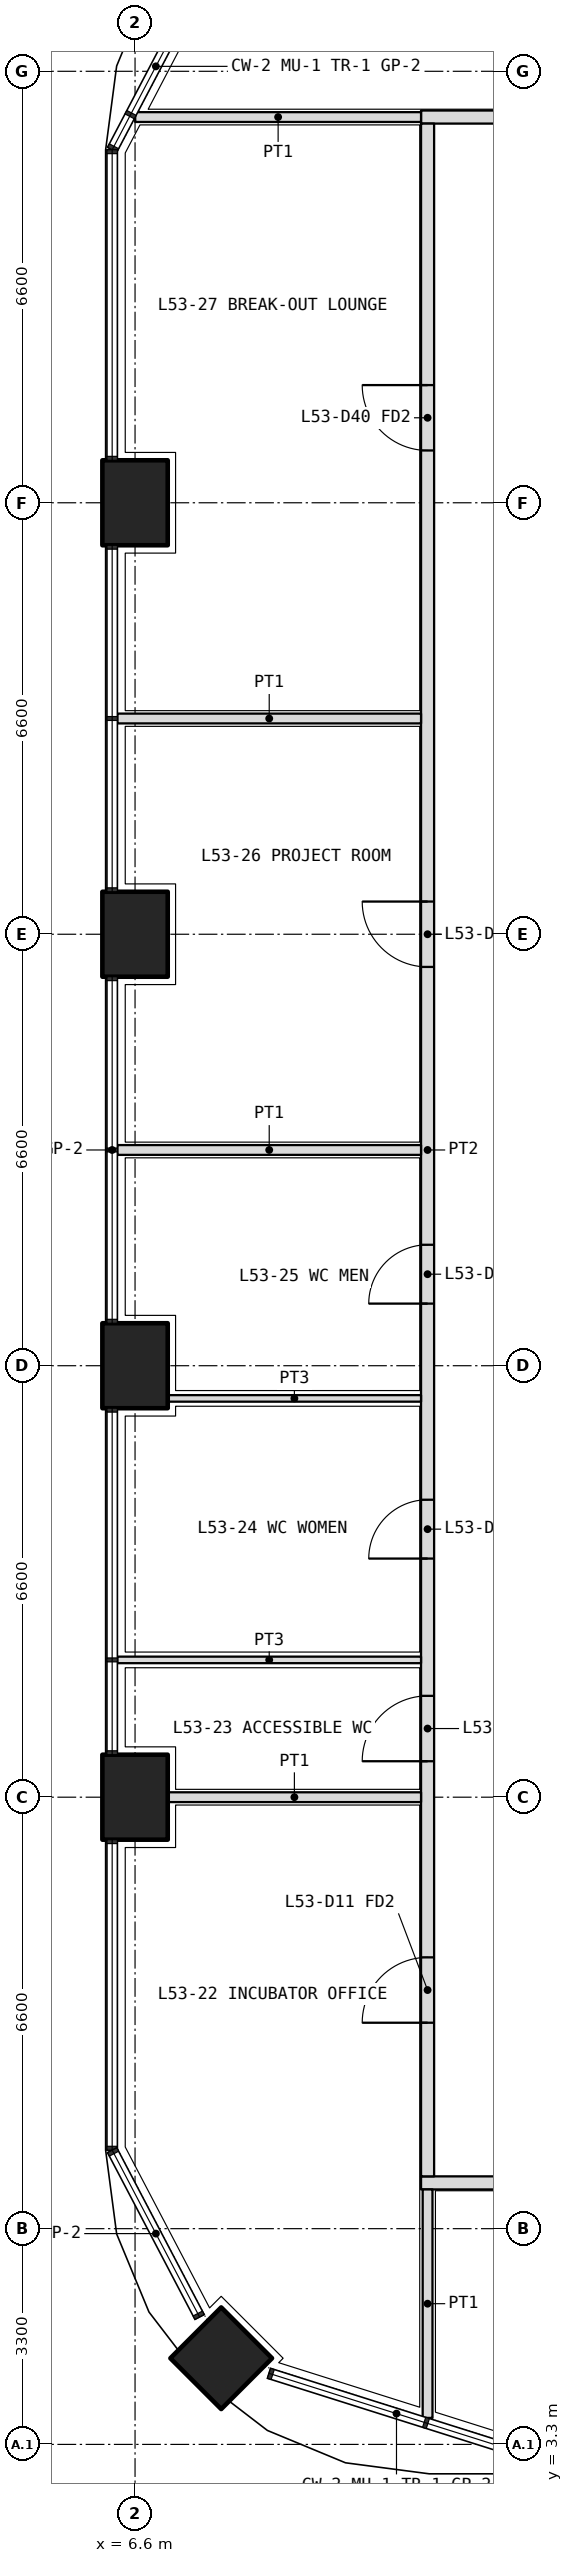
"""IFC4 building model, lengths in metres.
Left out: names, types, materials, properties, quantities, classifications, styles, units other than length and angle.
Written with IfcOpenShell. Run it as: python <this file> out.ifc"""

import sys

from ifc_helpers import new_model, si_unit, direction, frame, frame_2d, origin, origin_2d, place, context, subcontext, project, spatial, rectangle, extrude, element, fill, save


model = new_model("IFC4")
c1 = context("Model", 3, precision=1e-05, world=origin(), true_north=direction((0.0, 1.0)))
c2 = subcontext(c1, "Body", "Model", "MODEL_VIEW")
j1 = project(units=[si_unit("LENGTHUNIT", "METRE"), si_unit("PLANEANGLEUNIT", "RADIAN")], contexts=[c1])
p1 = place(None, origin())
s1 = spatial("IfcSite", under=j1, at=p1, CompositionType="ELEMENT")
p2 = place(p1, origin())
s2 = spatial("IfcBuilding", under=s1, at=p2, CompositionType="ELEMENT")
p3 = place(p2, frame((0.0, 0.0, 233.4)))
s3 = spatial("IfcBuildingStorey", under=s2, at=p3, CompositionType="ELEMENT", Elevation=233.4)
p4 = place(p3, frame((7.918, 4.618, 0.0), z_axis=(0.0, 0.0, 1.0), x_axis=(0.707106781187, 0.707106781187, 0.0)))
e1 = element("IfcColumn", 1, at=p4, inside=s3, PredefinedType="COLUMN", context=c2, shape_type="SweptSolid", body=[
    extrude(rectangle(XDim=1.1, YDim=1.1, at=origin_2d()), origin(), (0.0, 0.0, 1.0), 4.2),
])
for number, where, z_axis, x_axis in (
    (2, (6.6, 13.2, 0.0), (0.0, 0.0, 1.0), (0.0, 1.0, 0.0)),
    (3, (6.6, 19.8, 0.0), (0.0, 0.0, 1.0), (0.0, 1.0, 0.0)),
    (4, (6.6, 26.4, 0.0), (0.0, 0.0, 1.0), (0.0, 1.0, 0.0)),
    (5, (6.6, 33.0, 0.0), (0.0, 0.0, 1.0), (0.0, 1.0, 0.0)),
):
    element("IfcColumn", number, at=place(p3, frame(where, z_axis=z_axis, x_axis=x_axis)), inside=s3, PredefinedType="COLUMN", context=c2, shape_type="SweptSolid", body=[
        extrude(rectangle(XDim=1.3, YDim=1.0, at=origin_2d()), origin(), (0.0, 0.0, 1.0), 4.2),
    ])
p5 = place(p3, frame((10.975, 7.3, 0.0), z_axis=(0.0, 0.0, 1.0), x_axis=(1.0, 0.0, 0.0)))
e6 = element("IfcWall", 6, at=p5, inside=s3, PredefinedType="PARTITIONING", context=c2, shape_type="SweptSolid", body=[
    extrude(rectangle(XDim=30.85, YDim=0.2, at=frame_2d((15.425, 0.0))), origin(), (0.0, 0.0, 1.0), 3.0),
])
p6 = place(p5, frame((2.312, 0.0, 0.0)))
e7 = element("IfcOpeningElement", 7, at=p6, cuts=e6, PredefinedType="OPENING", context=c2, shape_type="SweptSolid", body=[
    extrude(rectangle(XDim=1.0, YDim=2.1, at=frame_2d((0.5, 1.05))), frame((0.0, 0.11, 0.0), z_axis=(0.0, -1.0, 0.0), x_axis=(1.0, 0.0, 0.0)), (0.0, 0.0, 1.0), 0.22),
])
p7 = place(p5, frame((13.275, 0.0, 0.0)))
e8 = element("IfcOpeningElement", 8, at=p7, cuts=e6, PredefinedType="OPENING", context=c2, shape_type="SweptSolid", body=[
    extrude(rectangle(XDim=1.0, YDim=2.1, at=frame_2d((0.5, 1.05))), frame((0.0, 0.11, 0.0), z_axis=(0.0, -1.0, 0.0), x_axis=(1.0, 0.0, 0.0)), (0.0, 0.0, 1.0), 0.22),
])
p8 = place(p5, frame((23.625, 0.0, 0.0)))
e9 = element("IfcOpeningElement", 9, at=p8, cuts=e6, PredefinedType="OPENING", context=c2, shape_type="SweptSolid", body=[
    extrude(rectangle(XDim=1.0, YDim=2.1, at=frame_2d((0.5, 1.05))), frame((0.0, 0.11, 0.0), z_axis=(0.0, -1.0, 0.0), x_axis=(1.0, 0.0, 0.0)), (0.0, 0.0, 1.0), 0.22),
])
p9 = place(p5, frame((26.925, 0.0, 0.0)))
e10 = element("IfcOpeningElement", 10, at=p9, cuts=e6, PredefinedType="OPENING", context=c2, shape_type="SweptSolid", body=[
    extrude(rectangle(XDim=1.0, YDim=2.1, at=frame_2d((0.5, 1.05))), frame((0.0, 0.11, 0.0), z_axis=(0.0, -1.0, 0.0), x_axis=(1.0, 0.0, 0.0)), (0.0, 0.0, 1.0), 0.22),
])
p10 = place(p5, frame((29.188, 0.0, 0.0)))
e11 = element("IfcOpeningElement", 11, at=p10, cuts=e6, PredefinedType="OPENING", context=c2, shape_type="SweptSolid", body=[
    extrude(rectangle(XDim=1.0, YDim=2.1, at=frame_2d((0.5, 1.05))), frame((0.0, 0.11, 0.0), z_axis=(0.0, -1.0, 0.0), x_axis=(1.0, 0.0, 0.0)), (0.0, 0.0, 1.0), 0.22),
])
p11 = place(p3, frame((10.975, 38.9, 0.0), z_axis=(0.0, 0.0, 1.0), x_axis=(1.0, 0.0, 0.0)))
e12 = element("IfcWall", 12, at=p11, inside=s3, PredefinedType="PARTITIONING", context=c2, shape_type="SweptSolid", body=[
    extrude(rectangle(XDim=8.825, YDim=0.2, at=frame_2d((4.413, 0.0))), origin(), (0.0, 0.0, 1.0), 3.0),
])
p12 = place(p11, frame((3.962, 0.0, 0.0)))
e13 = element("IfcOpeningElement", 13, at=p12, cuts=e12, PredefinedType="OPENING", context=c2, shape_type="SweptSolid", body=[
    extrude(rectangle(XDim=1.0, YDim=2.1, at=frame_2d((0.5, 1.05))), frame((0.0, 0.11, 0.0), z_axis=(0.0, -1.0, 0.0), x_axis=(1.0, 0.0, 0.0)), (0.0, 0.0, 1.0), 0.22),
])
p13 = place(p3, frame((11.075, 7.4, 0.0), z_axis=(0.0, 0.0, 1.0), x_axis=(0.0, 1.0, 0.0)))
e14 = element("IfcWall", 14, at=p13, inside=s3, PredefinedType="PARTITIONING", context=c2, shape_type="SweptSolid", body=[
    extrude(rectangle(XDim=31.4, YDim=0.2, at=frame_2d((15.7, 0.0))), origin(), (0.0, 0.0, 1.0), 3.0),
])
p14 = place(p13, frame((2.35, 0.0, 0.0)))
e15 = element("IfcOpeningElement", 15, at=p14, cuts=e14, PredefinedType="OPENING", context=c2, shape_type="SweptSolid", body=[
    extrude(rectangle(XDim=1.0, YDim=2.1, at=frame_2d((0.5, 1.05))), frame((0.0, 0.11, 0.0), z_axis=(0.0, -1.0, 0.0), x_axis=(1.0, 0.0, 0.0)), (0.0, 0.0, 1.0), 0.22),
])
p15 = place(p13, frame((6.35, 0.0, 0.0)))
e16 = element("IfcOpeningElement", 16, at=p15, cuts=e14, PredefinedType="OPENING", context=c2, shape_type="SweptSolid", body=[
    extrude(rectangle(XDim=1.0, YDim=2.1, at=frame_2d((0.5, 1.05))), frame((0.0, 0.11, 0.0), z_axis=(0.0, -1.0, 0.0), x_axis=(1.0, 0.0, 0.0)), (0.0, 0.0, 1.0), 0.22),
])
p16 = place(p13, frame((9.45, 0.0, 0.0)))
e17 = element("IfcOpeningElement", 17, at=p16, cuts=e14, PredefinedType="OPENING", context=c2, shape_type="SweptSolid", body=[
    extrude(rectangle(XDim=0.9, YDim=2.1, at=frame_2d((0.45, 1.05))), frame((0.0, 0.11, 0.0), z_axis=(0.0, -1.0, 0.0), x_axis=(1.0, 0.0, 0.0)), (0.0, 0.0, 1.0), 0.22),
])
p17 = place(p13, frame((13.35, 0.0, 0.0)))
e18 = element("IfcOpeningElement", 18, at=p17, cuts=e14, PredefinedType="OPENING", context=c2, shape_type="SweptSolid", body=[
    extrude(rectangle(XDim=0.9, YDim=2.1, at=frame_2d((0.45, 1.05))), frame((0.0, 0.11, 0.0), z_axis=(0.0, -1.0, 0.0), x_axis=(1.0, 0.0, 0.0)), (0.0, 0.0, 1.0), 0.22),
])
p18 = place(p13, frame((18.5, 0.0, 0.0)))
e19 = element("IfcOpeningElement", 19, at=p18, cuts=e14, PredefinedType="OPENING", context=c2, shape_type="SweptSolid", body=[
    extrude(rectangle(XDim=1.0, YDim=2.1, at=frame_2d((0.5, 1.05))), frame((0.0, 0.11, 0.0), z_axis=(0.0, -1.0, 0.0), x_axis=(1.0, 0.0, 0.0)), (0.0, 0.0, 1.0), 0.22),
])
p19 = place(p13, frame((26.4, 0.0, 0.0)))
e20 = element("IfcOpeningElement", 20, at=p19, cuts=e14, PredefinedType="OPENING", context=c2, shape_type="SweptSolid", body=[
    extrude(rectangle(XDim=1.0, YDim=2.1, at=frame_2d((0.5, 1.05))), frame((0.0, 0.11, 0.0), z_axis=(0.0, -1.0, 0.0), x_axis=(1.0, 0.0, 0.0)), (0.0, 0.0, 1.0), 0.22),
])
p20 = place(p3, frame((11.075, 3.705, 0.0), z_axis=(0.0, 0.0, 1.0), x_axis=(0.0, 1.0, 0.0)))
e21 = element("IfcWall", 21, at=p20, inside=s3, PredefinedType="PARTITIONING", context=c2, shape_type="SweptSolid", body=[
    extrude(rectangle(XDim=3.495, YDim=0.15, at=frame_2d((1.748, 0.0))), origin(), (0.0, 0.0, 1.0), 2.7),
])
p21 = place(p3, frame((6.603, 38.9, 0.0), z_axis=(0.0, 0.0, 1.0), x_axis=(1.0, 0.0, 0.0)))
e22 = element("IfcWall", 22, at=p21, inside=s3, PredefinedType="PARTITIONING", context=c2, shape_type="SweptSolid", body=[
    extrude(rectangle(XDim=4.373, YDim=0.15, at=frame_2d((2.186, 0.0))), origin(), (0.0, 0.0, 1.0), 2.7),
])
p22 = place(p3, frame((6.33, 15.3, 0.0), z_axis=(0.0, 0.0, 1.0), x_axis=(1.0, 0.0, 0.0)))
e23 = element("IfcWall", 23, at=p22, inside=s3, PredefinedType="PARTITIONING", context=c2, shape_type="SweptSolid", body=[
    extrude(rectangle(XDim=4.645, YDim=0.1, at=frame_2d((2.323, 0.0))), origin(), (0.0, 0.0, 1.0), 2.7),
])
p23 = place(p3, frame((7.1, 19.3, 0.0), z_axis=(0.0, 0.0, 1.0), x_axis=(1.0, 0.0, 0.0)))
e24 = element("IfcWall", 24, at=p23, inside=s3, PredefinedType="PARTITIONING", context=c2, shape_type="SweptSolid", body=[
    extrude(rectangle(XDim=3.875, YDim=0.1, at=frame_2d((1.938, 0.0))), origin(), (0.0, 0.0, 1.0), 3.0),
])
p24 = place(p3, frame((6.33, 23.1, 0.0), z_axis=(0.0, 0.0, 1.0), x_axis=(1.0, 0.0, 0.0)))
e25 = element("IfcWall", 25, at=p24, inside=s3, PredefinedType="PARTITIONING", context=c2, shape_type="SweptSolid", body=[
    extrude(rectangle(XDim=4.645, YDim=0.15, at=frame_2d((2.323, 0.0))), origin(), (0.0, 0.0, 1.0), 2.7),
])
p25 = place(p3, frame((7.1, 13.2, 0.0), z_axis=(0.0, 0.0, 1.0), x_axis=(1.0, 0.0, 0.0)))
e26 = element("IfcWall", 26, at=p25, inside=s3, PredefinedType="PARTITIONING", context=c2, shape_type="SweptSolid", body=[
    extrude(rectangle(XDim=3.875, YDim=0.15, at=frame_2d((1.938, 0.0))), origin(), (0.0, 0.0, 1.0), 3.0),
])
p26 = place(p3, frame((6.33, 29.7, 0.0), z_axis=(0.0, 0.0, 1.0), x_axis=(1.0, 0.0, 0.0)))
e27 = element("IfcWall", 27, at=p26, inside=s3, PredefinedType="PARTITIONING", context=c2, shape_type="SweptSolid", body=[
    extrude(rectangle(XDim=4.645, YDim=0.15, at=frame_2d((2.323, 0.0))), origin(), (0.0, 0.0, 1.0), 2.7),
])
p27 = place(p14, origin())
e28 = element("IfcDoor", 28, at=p27, inside=s3, OperationType="SINGLE_SWING_LEFT", PredefinedType="DOOR", context=c2, shape_type="SweptSolid", body=[
    extrude(rectangle(XDim=1.0, YDim=2.1, at=frame_2d((0.5, 1.05))), frame((0.0, 0.025, 0.0), z_axis=(0.0, -1.0, 0.0), x_axis=(1.0, 0.0, 0.0)), (0.0, 0.0, 1.0), 0.05),
])
fill(e15, e28)
p28 = place(p15, origin())
e29 = element("IfcDoor", 29, at=p28, inside=s3, OperationType="SINGLE_SWING_LEFT", PredefinedType="DOOR", context=c2, shape_type="SweptSolid", body=[
    extrude(rectangle(XDim=1.0, YDim=2.1, at=frame_2d((0.5, 1.05))), frame((0.0, 0.025, 0.0), z_axis=(0.0, -1.0, 0.0), x_axis=(1.0, 0.0, 0.0)), (0.0, 0.0, 1.0), 0.05),
])
fill(e16, e29)
p29 = place(p16, origin())
e30 = element("IfcDoor", 30, at=p29, inside=s3, OperationType="SINGLE_SWING_LEFT", PredefinedType="DOOR", context=c2, shape_type="SweptSolid", body=[
    extrude(rectangle(XDim=0.9, YDim=2.1, at=frame_2d((0.45, 1.05))), frame((0.0, 0.025, 0.0), z_axis=(0.0, -1.0, 0.0), x_axis=(1.0, 0.0, 0.0)), (0.0, 0.0, 1.0), 0.05),
])
fill(e17, e30)
p30 = place(p17, origin())
e31 = element("IfcDoor", 31, at=p30, inside=s3, OperationType="SINGLE_SWING_LEFT", PredefinedType="DOOR", context=c2, shape_type="SweptSolid", body=[
    extrude(rectangle(XDim=0.9, YDim=2.1, at=frame_2d((0.45, 1.05))), frame((0.0, 0.025, 0.0), z_axis=(0.0, -1.0, 0.0), x_axis=(1.0, 0.0, 0.0)), (0.0, 0.0, 1.0), 0.05),
])
fill(e18, e31)
p31 = place(p18, origin())
e32 = element("IfcDoor", 32, at=p31, inside=s3, OperationType="SINGLE_SWING_RIGHT", PredefinedType="DOOR", context=c2, shape_type="SweptSolid", body=[
    extrude(rectangle(XDim=1.0, YDim=2.1, at=frame_2d((0.5, 1.05))), frame((0.0, 0.025, 0.0), z_axis=(0.0, -1.0, 0.0), x_axis=(1.0, 0.0, 0.0)), (0.0, 0.0, 1.0), 0.05),
])
fill(e19, e32)
p32 = place(p19, origin())
e33 = element("IfcDoor", 33, at=p32, inside=s3, OperationType="SINGLE_SWING_RIGHT", PredefinedType="DOOR", context=c2, shape_type="SweptSolid", body=[
    extrude(rectangle(XDim=1.0, YDim=2.1, at=frame_2d((0.5, 1.05))), frame((0.0, 0.025, 0.0), z_axis=(0.0, -1.0, 0.0), x_axis=(1.0, 0.0, 0.0)), (0.0, 0.0, 1.0), 0.05),
])
fill(e20, e33)
save(model, sys.argv[1])
